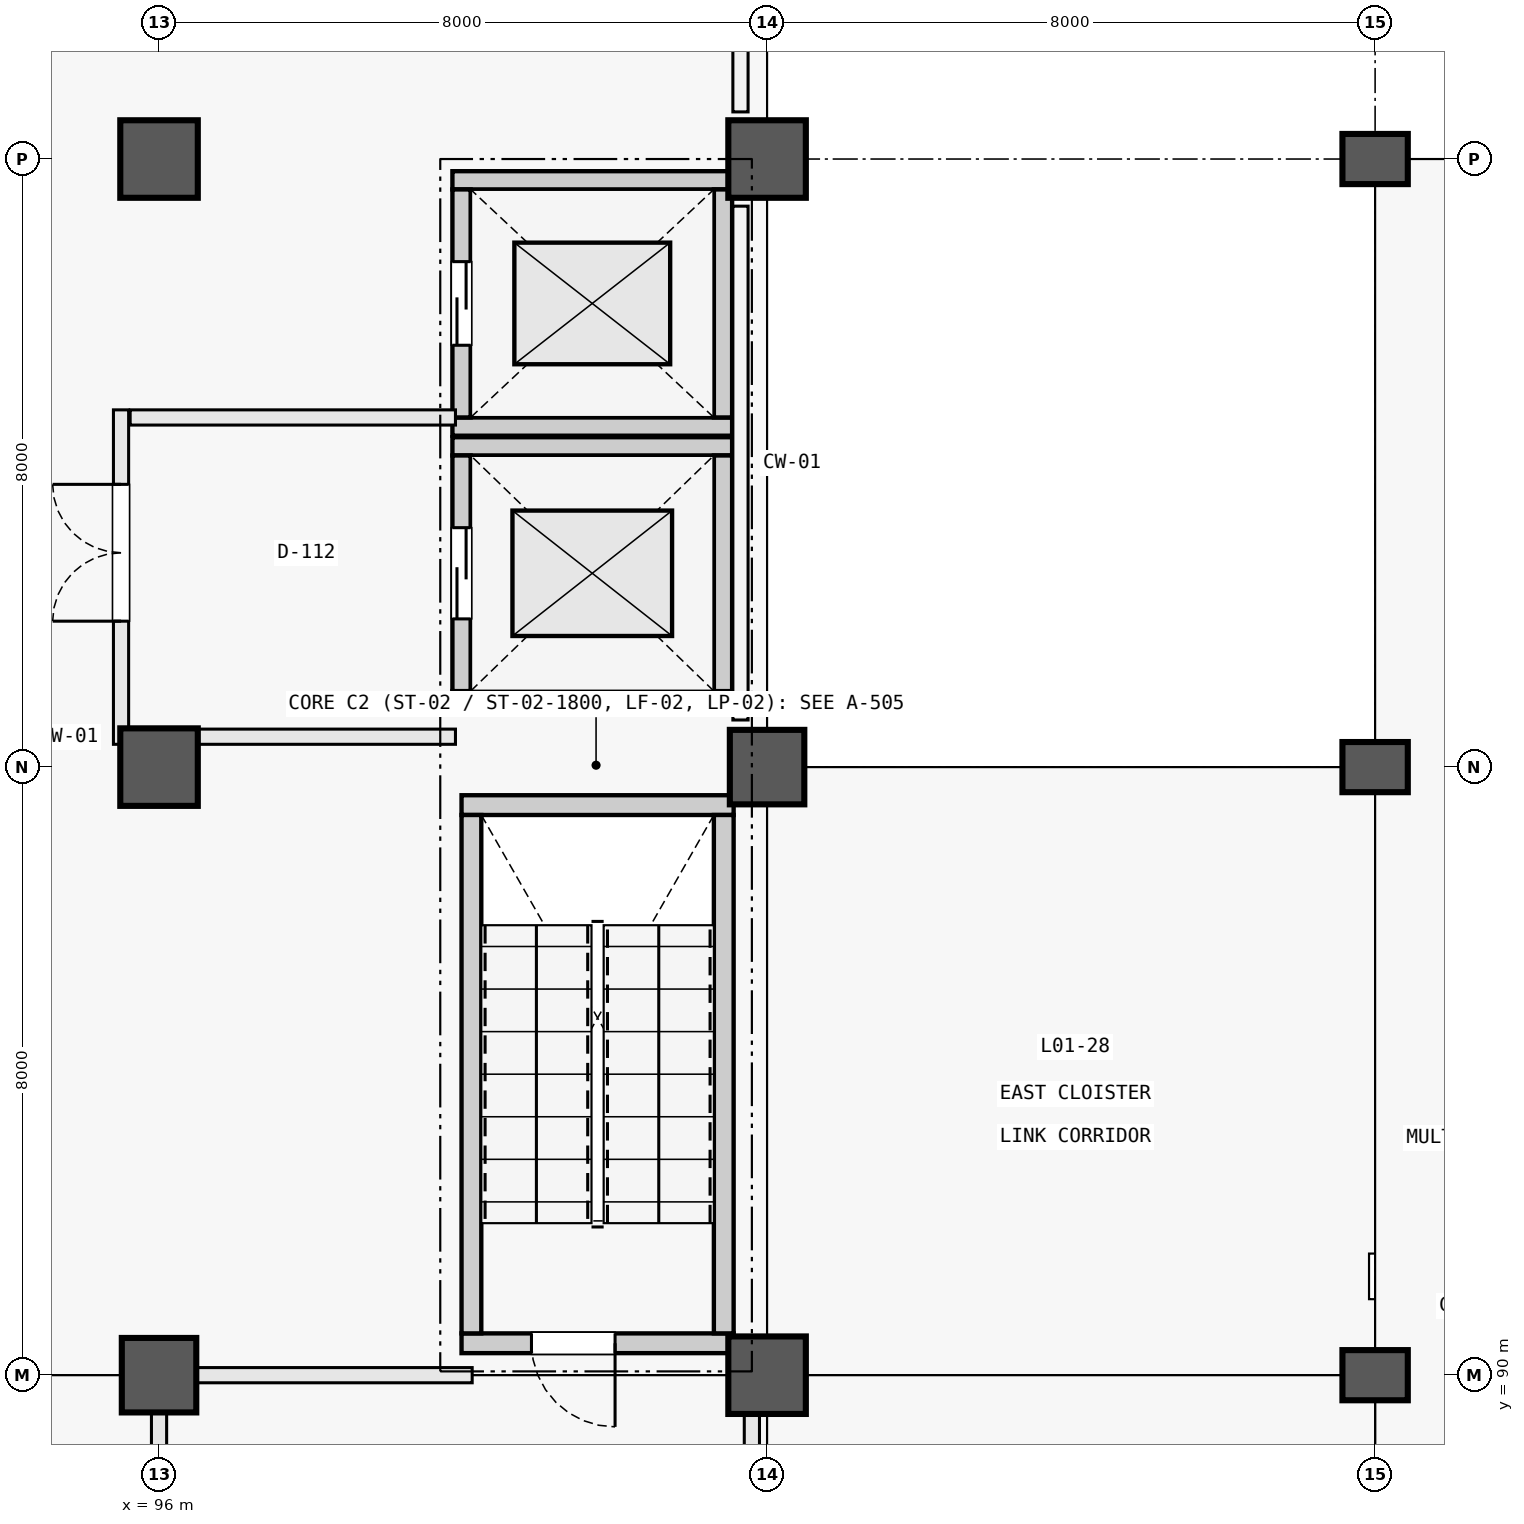
"""IFC4 building model, lengths in metres.
Left out: names, types, materials, properties, quantities, classifications, styles, units other than length and angle.
Written with IfcOpenShell. Run it as: python <this file> out.ifc"""

import sys

from ifc_helpers import new_model, si_unit, direction, frame, frame_2d, origin, origin_2d, place, context, subcontext, project, spatial, rectangle, circle, extrude, element, fill, save


model = new_model("IFC4")
c1 = context("Model", 3, precision=1e-05, world=origin(), true_north=direction((0.0, 1.0)))
c2 = subcontext(c1, "Body", "Model", "MODEL_VIEW")
j1 = project(units=[si_unit("LENGTHUNIT", "METRE"), si_unit("PLANEANGLEUNIT", "RADIAN")], contexts=[c1])
p1 = place(None, origin())
s1 = spatial("IfcSite", under=j1, at=p1, CompositionType="ELEMENT")
p2 = place(p1, origin())
s2 = spatial("IfcBuilding", under=s1, at=p2, CompositionType="ELEMENT")
p3 = place(p2, origin())
s3 = spatial("IfcBuildingStorey", under=s2, at=p3, CompositionType="ELEMENT", Elevation=0.0)
p4 = place(p3, frame((96.0, 90.0, 0.0), z_axis=(0.0, 0.0, 1.0), x_axis=(1.0, 0.0, 0.0)))
e1 = element("IfcColumn", 1, at=p4, inside=s3, PredefinedType="COLUMN", context=c2, shape_type="SweptSolid", body=[
    extrude(rectangle(XDim=0.98, YDim=0.98, at=origin_2d()), origin(), (0.0, 0.0, 1.0), 5.4),
])
for number, where, z_axis, x_axis in (
    (2, (96.0, 98.0, 0.0), (0.0, 0.0, 1.0), (1.0, 0.0, 0.0)),
    (3, (96.0, 106.0, 0.0), (0.0, 0.0, 1.0), (1.0, 0.0, 0.0)),
    (4, (104.0, 90.0, 0.0), (0.0, 0.0, 1.0), (1.0, 0.0, 0.0)),
):
    element("IfcColumn", number, at=place(p3, frame(where, z_axis=z_axis, x_axis=x_axis)), inside=s3, PredefinedType="COLUMN", context=c2, shape_type="SweptSolid", body=[
        extrude(circle(Radius=0.51, at=origin_2d()), origin(), (0.0, 0.0, 1.0), 5.4),
    ])
p5 = place(p3, frame((104.0, 98.0, 0.0), z_axis=(0.0, 0.0, 1.0), x_axis=(1.0, 0.0, 0.0)))
e5 = element("IfcColumn", 5, at=p5, inside=s3, PredefinedType="COLUMN", context=c2, shape_type="SweptSolid", body=[
    extrude(rectangle(XDim=0.98, YDim=0.98, at=origin_2d()), origin(), (0.0, 0.0, 1.0), 5.4),
])
p6 = place(p3, frame((104.0, 106.0, 0.0), z_axis=(0.0, 0.0, 1.0), x_axis=(1.0, 0.0, 0.0)))
e6 = element("IfcColumn", 6, at=p6, inside=s3, PredefinedType="COLUMN", context=c2, shape_type="SweptSolid", body=[
    extrude(circle(Radius=0.51, at=origin_2d()), origin(), (0.0, 0.0, 1.0), 5.4),
])
for number, where, z_axis, x_axis in (
    (7, (112.0, 90.0, 0.0), (0.0, 0.0, 1.0), (1.0, 0.0, 0.0)),
    (8, (112.0, 98.0, 0.0), (0.0, 0.0, 1.0), (1.0, 0.0, 0.0)),
    (9, (112.0, 106.0, 0.0), (0.0, 0.0, 1.0), (1.0, 0.0, 0.0)),
):
    element("IfcColumn", number, at=place(p3, frame(where, z_axis=z_axis, x_axis=x_axis)), inside=s3, PredefinedType="COLUMN", context=c2, shape_type="SweptSolid", body=[
        extrude(rectangle(XDim=0.86, YDim=0.66, at=origin_2d()), origin(), (0.0, 0.0, 1.0), 5.4),
    ])
p7 = place(p3, frame((99.98, 90.42, 0.0), z_axis=(0.0, 0.0, 1.0), x_axis=(1.0, 0.0, 0.0)))
e10 = element("IfcWall", 10, at=p7, inside=s3, PredefinedType="SOLIDWALL", context=c2, shape_type="SweptSolid", body=[
    extrude(rectangle(XDim=3.58, YDim=0.26, at=frame_2d((1.79, 0.0))), origin(), (0.0, 0.0, 1.0), 5.4),
])
p8 = place(p7, frame((0.92, 0.0, 0.0)))
e11 = element("IfcOpeningElement", 11, at=p8, cuts=e10, PredefinedType="OPENING", context=c2, shape_type="SweptSolid", body=[
    extrude(rectangle(XDim=1.1, YDim=2.2, at=frame_2d((0.55, 1.1))), frame((0.0, 0.142, 0.0), z_axis=(0.0, -1.0, 0.0), x_axis=(1.0, 0.0, 0.0)), (0.0, 0.0, 1.0), 0.284),
])
p9 = place(p3, frame((99.98, 97.5, 0.0), z_axis=(0.0, 0.0, 1.0), x_axis=(1.0, 0.0, 0.0)))
e12 = element("IfcWall", 12, at=p9, inside=s3, PredefinedType="SOLIDWALL", context=c2, shape_type="SweptSolid", body=[
    extrude(rectangle(XDim=3.58, YDim=0.26, at=frame_2d((1.79, 0.0))), origin(), (0.0, 0.0, 1.0), 5.4),
])
for number, where, z_axis, x_axis in (
    (13, (100.11, 90.55, 0.0), (0.0, 0.0, 1.0), (0.0, 1.0, 0.0)),
    (14, (103.43, 90.55, 0.0), (0.0, 0.0, 1.0), (0.0, 1.0, 0.0)),
):
    element("IfcWall", number, at=place(p3, frame(where, z_axis=z_axis, x_axis=x_axis)), inside=s3, PredefinedType="SOLIDWALL", context=c2, shape_type="SweptSolid", body=[
        extrude(rectangle(XDim=6.82, YDim=0.26, at=frame_2d((3.41, 0.0))), origin(), (0.0, 0.0, 1.0), 5.4),
    ])
for number, where, z_axis, x_axis in (
    (15, (99.86, 98.88, 0.0), (0.0, 0.0, 1.0), (1.0, 0.0, 0.0)),
    (16, (99.86, 102.22, 0.0), (0.0, 0.0, 1.0), (1.0, 0.0, 0.0)),
):
    element("IfcWall", number, at=place(p3, frame(where, z_axis=z_axis, x_axis=x_axis)), inside=s3, PredefinedType="SOLIDWALL", context=c2, shape_type="SweptSolid", body=[
        extrude(rectangle(XDim=3.68, YDim=0.24, at=frame_2d((1.84, 0.0))), origin(), (0.0, 0.0, 1.0), 5.4),
    ])
p10 = place(p3, frame((99.98, 99.0, 0.0), z_axis=(0.0, 0.0, 1.0), x_axis=(0.0, 1.0, 0.0)))
e17 = element("IfcWall", 17, at=p10, inside=s3, PredefinedType="SOLIDWALL", context=c2, shape_type="SweptSolid", body=[
    extrude(rectangle(XDim=3.1, YDim=0.24, at=frame_2d((1.55, 0.0))), origin(), (0.0, 0.0, 1.0), 5.4),
])
p11 = place(p10, frame((0.95, 0.0, 0.0)))
e18 = element("IfcOpeningElement", 18, at=p11, cuts=e17, PredefinedType="OPENING", context=c2, shape_type="SweptSolid", body=[
    extrude(rectangle(XDim=1.2, YDim=2.2, at=frame_2d((0.6, 1.1))), frame((0.0, 0.132, 0.0), z_axis=(0.0, -1.0, 0.0), x_axis=(1.0, 0.0, 0.0)), (0.0, 0.0, 1.0), 0.264),
])
p12 = place(p3, frame((103.42, 99.0, 0.0), z_axis=(0.0, 0.0, 1.0), x_axis=(0.0, 1.0, 0.0)))
e19 = element("IfcWall", 19, at=p12, inside=s3, PredefinedType="SOLIDWALL", context=c2, shape_type="SweptSolid", body=[
    extrude(rectangle(XDim=3.1, YDim=0.24, at=frame_2d((1.55, 0.0))), origin(), (0.0, 0.0, 1.0), 5.4),
])
for number, where, z_axis, x_axis in (
    (20, (99.86, 102.48, 0.0), (0.0, 0.0, 1.0), (1.0, 0.0, 0.0)),
    (21, (99.86, 105.72, 0.0), (0.0, 0.0, 1.0), (1.0, 0.0, 0.0)),
):
    element("IfcWall", number, at=place(p3, frame(where, z_axis=z_axis, x_axis=x_axis)), inside=s3, PredefinedType="SOLIDWALL", context=c2, shape_type="SweptSolid", body=[
        extrude(rectangle(XDim=3.68, YDim=0.24, at=frame_2d((1.84, 0.0))), origin(), (0.0, 0.0, 1.0), 5.4),
    ])
p13 = place(p3, frame((99.98, 102.6, 0.0), z_axis=(0.0, 0.0, 1.0), x_axis=(0.0, 1.0, 0.0)))
e22 = element("IfcWall", 22, at=p13, inside=s3, PredefinedType="SOLIDWALL", context=c2, shape_type="SweptSolid", body=[
    extrude(rectangle(XDim=3.0, YDim=0.24, at=frame_2d((1.5, 0.0))), origin(), (0.0, 0.0, 1.0), 5.4),
])
p14 = place(p13, frame((0.95, 0.0, 0.0)))
e23 = element("IfcOpeningElement", 23, at=p14, cuts=e22, PredefinedType="OPENING", context=c2, shape_type="SweptSolid", body=[
    extrude(rectangle(XDim=1.1, YDim=2.2, at=frame_2d((0.55, 1.1))), frame((0.0, 0.132, 0.0), z_axis=(0.0, -1.0, 0.0), x_axis=(1.0, 0.0, 0.0)), (0.0, 0.0, 1.0), 0.264),
])
p15 = place(p3, frame((103.42, 102.6, 0.0), z_axis=(0.0, 0.0, 1.0), x_axis=(0.0, 1.0, 0.0)))
e24 = element("IfcWall", 24, at=p15, inside=s3, PredefinedType="SOLIDWALL", context=c2, shape_type="SweptSolid", body=[
    extrude(rectangle(XDim=3.0, YDim=0.24, at=frame_2d((1.5, 0.0))), origin(), (0.0, 0.0, 1.0), 5.4),
])
for number, where, z_axis, x_axis in (
    (25, (95.62, 98.4, 0.0), (0.0, 0.0, 1.0), (1.0, 0.0, 0.0)),
    (26, (95.62, 102.6, 0.0), (0.0, 0.0, 1.0), (1.0, 0.0, 0.0)),
):
    element("IfcWall", number, at=place(p3, frame(where, z_axis=z_axis, x_axis=x_axis)), inside=s3, PredefinedType="PARTITIONING", context=c2, shape_type="SweptSolid", body=[
        extrude(rectangle(XDim=4.28, YDim=0.2, at=frame_2d((2.14, 0.0))), origin(), (0.0, 0.0, 1.0), 4.05),
    ])
p16 = place(p3, frame((95.5, 98.3, 0.0), z_axis=(0.0, 0.0, 1.0), x_axis=(0.0, 1.0, 0.0)))
e27 = element("IfcWall", 27, at=p16, inside=s3, PredefinedType="PARTITIONING", context=c2, shape_type="SweptSolid", body=[
    extrude(rectangle(XDim=4.4, YDim=0.2, at=frame_2d((2.2, 0.0))), origin(), (0.0, 0.0, 1.0), 4.05),
])
p17 = place(p16, frame((1.62, 0.0, 0.0)))
e28 = element("IfcOpeningElement", 28, at=p17, cuts=e27, PredefinedType="OPENING", context=c2, shape_type="SweptSolid", body=[
    extrude(rectangle(XDim=1.8, YDim=2.25, at=frame_2d((0.9, 1.125))), frame((0.0, 0.112, 0.0), z_axis=(0.0, -1.0, 0.0), x_axis=(1.0, 0.0, 0.0)), (0.0, 0.0, 1.0), 0.224),
])
p18 = place(p3, frame((103.8, 84.6, 0.0), z_axis=(0.0, 0.0, 1.0), x_axis=(0.0, 1.0, 0.0)))
e29 = element("IfcWall", 29, at=p18, inside=s3, PredefinedType="PARTITIONING", context=c2, shape_type="SweptSolid", body=[
    extrude(rectangle(XDim=5.28, YDim=0.2, at=frame_2d((2.64, 0.0))), origin(), (0.0, 0.0, 1.0), 3.88),
])
p19 = place(p18, frame((2.04, 0.0, 0.0)))
e30 = element("IfcOpeningElement", 30, at=p19, cuts=e29, PredefinedType="OPENING", context=c2, shape_type="SweptSolid", body=[
    extrude(rectangle(XDim=1.2, YDim=2.25, at=frame_2d((0.6, 1.125))), frame((0.0, 0.112, 0.0), z_axis=(0.0, -1.0, 0.0), x_axis=(1.0, 0.0, 0.0)), (0.0, 0.0, 1.0), 0.224),
])
p20 = place(p3, frame((96.0, 84.72, 0.0), z_axis=(0.0, 0.0, 1.0), x_axis=(0.0, 1.0, 0.0)))
e31 = element("IfcWall", 31, at=p20, inside=s3, PredefinedType="PARTITIONING", context=c2, shape_type="SweptSolid", body=[
    extrude(rectangle(XDim=4.78, YDim=0.2, at=frame_2d((2.39, 0.0))), origin(), (0.0, 0.0, 1.0), 3.88),
])
p21 = place(p20, frame((1.79, 0.0, 0.0)))
e32 = element("IfcOpeningElement", 32, at=p21, cuts=e31, PredefinedType="OPENING", context=c2, shape_type="SweptSolid", body=[
    extrude(rectangle(XDim=1.2, YDim=2.25, at=frame_2d((0.6, 1.125))), frame((0.0, 0.112, 0.0), z_axis=(0.0, -1.0, 0.0), x_axis=(1.0, 0.0, 0.0)), (0.0, 0.0, 1.0), 0.224),
])
p22 = place(p3, frame((96.5, 90.0, 0.0), z_axis=(0.0, 0.0, 1.0), x_axis=(1.0, 0.0, 0.0)))
e33 = element("IfcWall", 33, at=p22, inside=s3, PredefinedType="PARTITIONING", context=c2, shape_type="SweptSolid", body=[
    extrude(rectangle(XDim=3.62, YDim=0.2, at=frame_2d((1.81, 0.0))), origin(), (0.0, 0.0, 1.0), 3.88),
])
p23 = place(p8, frame((1.1, 0.0, 0.0), z_axis=(0.0, 0.0, 1.0), x_axis=(-1.0, 0.0, 0.0)))
e34 = element("IfcDoor", 34, at=p23, inside=s3, OperationType="SINGLE_SWING_RIGHT", PredefinedType="DOOR", context=c2, shape_type="SweptSolid", body=[
    extrude(rectangle(XDim=1.1, YDim=2.2, at=frame_2d((0.55, 1.1))), frame((0.0, 0.025, 0.0), z_axis=(0.0, -1.0, 0.0), x_axis=(1.0, 0.0, 0.0)), (0.0, 0.0, 1.0), 0.05),
])
fill(e11, e34)
p24 = place(p11, origin())
e35 = element("IfcDoor", 35, at=p24, inside=s3, OperationType="DOUBLE_DOOR_SLIDING", PredefinedType="DOOR", context=c2, shape_type="SweptSolid", body=[
    extrude(rectangle(XDim=1.2, YDim=2.2, at=frame_2d((0.6, 1.1))), frame((0.0, 0.025, 0.0), z_axis=(0.0, -1.0, 0.0), x_axis=(1.0, 0.0, 0.0)), (0.0, 0.0, 1.0), 0.05),
])
fill(e18, e35)
p25 = place(p14, origin())
e36 = element("IfcDoor", 36, at=p25, inside=s3, OperationType="DOUBLE_DOOR_SLIDING", PredefinedType="DOOR", context=c2, shape_type="SweptSolid", body=[
    extrude(rectangle(XDim=1.1, YDim=2.2, at=frame_2d((0.55, 1.1))), frame((0.0, 0.025, 0.0), z_axis=(0.0, -1.0, 0.0), x_axis=(1.0, 0.0, 0.0)), (0.0, 0.0, 1.0), 0.05),
])
fill(e23, e36)
p26 = place(p17, origin())
e37 = element("IfcDoor", 37, at=p26, inside=s3, OperationType="DOUBLE_DOOR_SINGLE_SWING", PredefinedType="DOOR", context=c2, shape_type="SweptSolid", body=[
    extrude(rectangle(XDim=1.8, YDim=2.25, at=frame_2d((0.9, 1.125))), frame((0.0, 0.025, 0.0), z_axis=(0.0, -1.0, 0.0), x_axis=(1.0, 0.0, 0.0)), (0.0, 0.0, 1.0), 0.05),
])
fill(e28, e37)
save(model, sys.argv[1])
